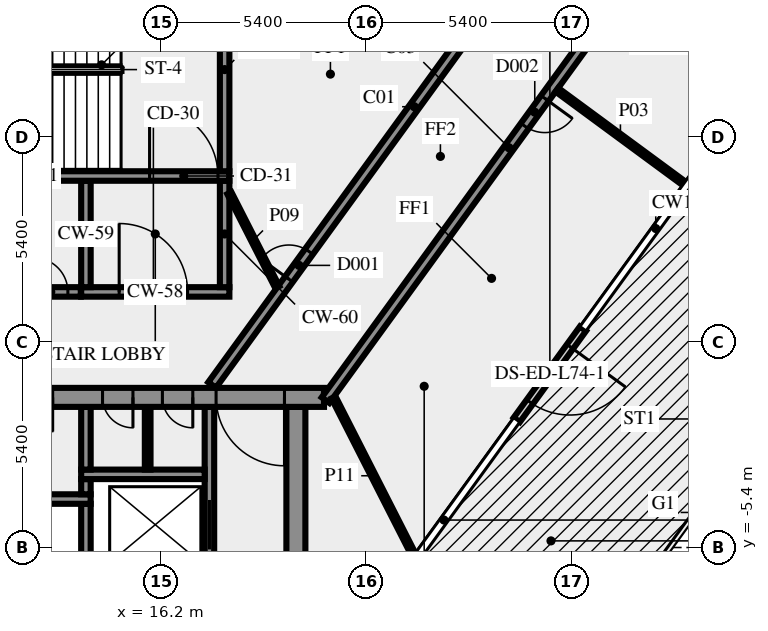
"""IFC4 building model, lengths in metres.
Left out: names, types, materials, properties, quantities, classifications, styles, units other than length and angle.
Written with IfcOpenShell. Run it as: python <this file> out.ifc"""

import sys

from ifc_helpers import new_model, si_unit, direction, frame, frame_2d, origin, place, context, subcontext, project, spatial, rectangle, extrude, element, fill, save


model = new_model("IFC4")
c1 = context("Model", 3, precision=1e-05, world=origin(), true_north=direction((0.0, 1.0)))
c2 = subcontext(c1, "Body", "Model", "MODEL_VIEW")
j1 = project(units=[si_unit("LENGTHUNIT", "METRE"), si_unit("PLANEANGLEUNIT", "RADIAN")], contexts=[c1])
p1 = place(None, origin())
s1 = spatial("IfcSite", under=j1, at=p1, CompositionType="ELEMENT")
p2 = place(p1, origin())
s2 = spatial("IfcBuilding", under=s1, at=p2, CompositionType="ELEMENT")
p3 = place(p2, frame((0.0, 0.0, 319.0)))
s3 = spatial("IfcBuildingStorey", under=s2, at=p3, CompositionType="ELEMENT", Elevation=319.0)
p4 = place(p3, frame((27.304, 0.356, 0.0), z_axis=(0.0, 0.0, 1.0), x_axis=(-0.587774760134, -0.809024617271, 0.0)))
e1 = element("IfcWall", 1, at=p4, inside=s3, PredefinedType="SOLIDWALL", context=c2, shape_type="SweptSolid", body=[
    extrude(rectangle(XDim=2.963, YDim=0.2, at=frame_2d((1.481, 0.0))), origin(), (0.0, 0.0, 1.0), 3.65),
])
p5 = place(p4, frame((0.582, 0.0, 0.0)))
e2 = element("IfcOpeningElement", 2, at=p5, cuts=e1, PredefinedType="OPENING", context=c2, shape_type="SweptSolid", body=[
    extrude(rectangle(XDim=1.8, YDim=2.4, at=frame_2d((0.9, 1.2))), frame((0.0, 0.11, 0.0), z_axis=(0.0, -1.0, 0.0), x_axis=(1.0, 0.0, 0.0)), (0.0, 0.0, 1.0), 0.22),
])
p6 = place(p3, frame((14.225, -6.0, 0.0), z_axis=(0.0, 0.0, 1.0), x_axis=(0.0, 1.0, 0.0)))
e3 = element("IfcWall", 3, at=p6, inside=s3, PredefinedType="SHEAR", context=c2, shape_type="SweptSolid", body=[
    extrude(rectangle(XDim=1.75, YDim=0.25, at=frame_2d((0.875, 0.0))), origin(), (0.0, 0.0, 1.0), 3.65),
])
p7 = place(p3, frame((17.475, -6.0, 0.0), z_axis=(0.0, 0.0, 1.0), x_axis=(0.0, 1.0, 0.0)))
e4 = element("IfcWall", 4, at=p7, inside=s3, PredefinedType="SHEAR", context=c2, shape_type="SweptSolid", body=[
    extrude(rectangle(XDim=4.3, YDim=0.25, at=frame_2d((2.15, 0.0))), origin(), (0.0, 0.0, 1.0), 3.65),
])
p8 = place(p7, frame((0.55, 0.0, 0.0)))
e5 = element("IfcOpeningElement", 5, at=p8, cuts=e4, PredefinedType="OPENING", context=c2, shape_type="SweptSolid", body=[
    extrude(rectangle(XDim=1.3, YDim=2.1, at=frame_2d((0.65, 1.05))), frame((0.0, 0.135, 0.0), z_axis=(0.0, -1.0, 0.0), x_axis=(1.0, 0.0, 0.0)), (0.0, 0.0, 1.0), 0.27),
])
p9 = place(p3, frame((19.75, -6.0, 0.0), z_axis=(0.0, 0.0, 1.0), x_axis=(0.0, 1.0, 0.0)))
e6 = element("IfcWall", 6, at=p9, inside=s3, PredefinedType="SHEAR", context=c2, shape_type="SweptSolid", body=[
    extrude(rectangle(XDim=4.3, YDim=0.5, at=frame_2d((2.15, 0.0))), origin(), (0.0, 0.0, 1.0), 3.65),
])
p10 = place(p3, frame((-0.6, -4.125, 0.0), z_axis=(0.0, 0.0, 1.0), x_axis=(1.0, 0.0, 0.0)))
e7 = element("IfcWall", 7, at=p10, inside=s3, PredefinedType="SHEAR", context=c2, shape_type="SweptSolid", body=[
    extrude(rectangle(XDim=14.95, YDim=0.25, at=frame_2d((7.475, 0.0))), origin(), (0.0, 0.0, 1.0), 3.65),
])
p11 = place(p10, frame((2.75, 0.0, 0.0)))
e8 = element("IfcOpeningElement", 8, at=p11, cuts=e7, PredefinedType="OPENING", context=c2, shape_type="SweptSolid", body=[
    extrude(rectangle(XDim=1.3, YDim=2.1, at=frame_2d((0.65, 1.05))), frame((0.0, 0.135, 0.0), z_axis=(0.0, -1.0, 0.0), x_axis=(1.0, 0.0, 0.0)), (0.0, 0.0, 1.0), 0.27),
])
p12 = place(p3, frame((14.225, -4.0, 0.0), z_axis=(0.0, 0.0, 1.0), x_axis=(0.0, 1.0, 0.0)))
e9 = element("IfcWall", 9, at=p12, inside=s3, PredefinedType="SHEAR", context=c2, shape_type="SweptSolid", body=[
    extrude(rectangle(XDim=0.4, YDim=0.25, at=frame_2d((0.2, 0.0))), origin(), (0.0, 0.0, 1.0), 3.65),
])
p13 = place(p3, frame((14.1, -3.475, 0.0), z_axis=(0.0, 0.0, 1.0), x_axis=(1.0, 0.0, 0.0)))
e10 = element("IfcWall", 10, at=p13, inside=s3, PredefinedType="SHEAR", context=c2, shape_type="SweptSolid", body=[
    extrude(rectangle(XDim=3.25, YDim=0.25, at=frame_2d((1.625, 0.0))), origin(), (0.0, 0.0, 1.0), 3.65),
])
p14 = place(p3, frame((14.225, -3.35, 0.0), z_axis=(0.0, 0.0, 1.0), x_axis=(0.0, 1.0, 0.0)))
e11 = element("IfcWall", 11, at=p14, inside=s3, PredefinedType="SHEAR", context=c2, shape_type="SweptSolid", body=[
    extrude(rectangle(XDim=1.65, YDim=0.25, at=frame_2d((0.825, 0.0))), origin(), (0.0, 0.0, 1.0), 3.65),
])
p15 = place(p3, frame((15.85, -3.35, 0.0), z_axis=(0.0, 0.0, 1.0), x_axis=(0.0, 1.0, 0.0)))
e12 = element("IfcWall", 12, at=p15, inside=s3, PredefinedType="PARTITIONING", context=c2, shape_type="SweptSolid", body=[
    extrude(rectangle(XDim=1.65, YDim=0.15, at=frame_2d((0.825, 0.0))), origin(), (0.0, 0.0, 1.0), 3.65),
])
p16 = place(p3, frame((20.49, -1.45, 0.0), z_axis=(0.0, 0.0, 1.0), x_axis=(-1.0, 0.0, 0.0)))
e13 = element("IfcWall", 13, at=p16, inside=s3, PredefinedType="SHEAR", context=c2, shape_type="SweptSolid", body=[
    extrude(rectangle(XDim=40.98, YDim=0.5, at=frame_2d((20.49, 0.0))), origin(), (0.0, 0.0, 1.0), 3.65),
])
p17 = place(p16, frame((38.14, 0.0, 0.0)))
e14 = element("IfcOpeningElement", 14, at=p17, cuts=e13, PredefinedType="OPENING", context=c2, shape_type="SweptSolid", body=[
    extrude(rectangle(XDim=1.8, YDim=2.1, at=frame_2d((0.9, 1.05))), frame((0.0, 0.26, 0.0), z_axis=(0.0, -1.0, 0.0), x_axis=(1.0, 0.0, 0.0)), (0.0, 0.0, 1.0), 0.52),
])
p18 = place(p16, frame((35.89, 0.0, 0.0)))
e15 = element("IfcOpeningElement", 15, at=p18, cuts=e13, PredefinedType="OPENING", context=c2, shape_type="SweptSolid", body=[
    extrude(rectangle(XDim=0.9, YDim=2.1, at=frame_2d((0.45, 1.05))), frame((0.0, 0.26, 0.0), z_axis=(0.0, -1.0, 0.0), x_axis=(1.0, 0.0, 0.0)), (0.0, 0.0, 1.0), 0.52),
])
p19 = place(p16, frame((32.94, 0.0, 0.0)))
e16 = element("IfcOpeningElement", 16, at=p19, cuts=e13, PredefinedType="OPENING", context=c2, shape_type="SweptSolid", body=[
    extrude(rectangle(XDim=0.9, YDim=2.1, at=frame_2d((0.45, 1.05))), frame((0.0, 0.26, 0.0), z_axis=(0.0, -1.0, 0.0), x_axis=(1.0, 0.0, 0.0)), (0.0, 0.0, 1.0), 0.52),
])
p20 = place(p16, frame((31.015, 0.0, 0.0)))
e17 = element("IfcOpeningElement", 17, at=p20, cuts=e13, PredefinedType="OPENING", context=c2, shape_type="SweptSolid", body=[
    extrude(rectangle(XDim=0.8, YDim=2.1, at=frame_2d((0.4, 1.05))), frame((0.0, 0.26, 0.0), z_axis=(0.0, -1.0, 0.0), x_axis=(1.0, 0.0, 0.0)), (0.0, 0.0, 1.0), 0.52),
])
p21 = place(p16, frame((24.765, 0.0, 0.0)))
e18 = element("IfcOpeningElement", 18, at=p21, cuts=e13, PredefinedType="OPENING", context=c2, shape_type="SweptSolid", body=[
    extrude(rectangle(XDim=0.8, YDim=2.1, at=frame_2d((0.4, 1.05))), frame((0.0, 0.26, 0.0), z_axis=(0.0, -1.0, 0.0), x_axis=(1.0, 0.0, 0.0)), (0.0, 0.0, 1.0), 0.52),
])
p22 = place(p16, frame((21.765, 0.0, 0.0)))
e19 = element("IfcOpeningElement", 19, at=p22, cuts=e13, PredefinedType="OPENING", context=c2, shape_type="SweptSolid", body=[
    extrude(rectangle(XDim=2.0, YDim=2.1, at=frame_2d((1.0, 1.05))), frame((0.0, 0.26, 0.0), z_axis=(0.0, -1.0, 0.0), x_axis=(1.0, 0.0, 0.0)), (0.0, 0.0, 1.0), 0.52),
])
p23 = place(p16, frame((15.103, 0.0, 0.0)))
e20 = element("IfcOpeningElement", 20, at=p23, cuts=e13, PredefinedType="OPENING", context=c2, shape_type="SweptSolid", body=[
    extrude(rectangle(XDim=0.9, YDim=2.1, at=frame_2d((0.45, 1.05))), frame((0.0, 0.26, 0.0), z_axis=(0.0, -1.0, 0.0), x_axis=(1.0, 0.0, 0.0)), (0.0, 0.0, 1.0), 0.52),
])
p24 = place(p16, frame((13.04, 0.0, 0.0)))
e21 = element("IfcOpeningElement", 21, at=p24, cuts=e13, PredefinedType="OPENING", context=c2, shape_type="SweptSolid", body=[
    extrude(rectangle(XDim=0.9, YDim=2.1, at=frame_2d((0.45, 1.05))), frame((0.0, 0.26, 0.0), z_axis=(0.0, -1.0, 0.0), x_axis=(1.0, 0.0, 0.0)), (0.0, 0.0, 1.0), 0.52),
])
p25 = place(p16, frame((10.177, 0.0, 0.0)))
e22 = element("IfcOpeningElement", 22, at=p25, cuts=e13, PredefinedType="OPENING", context=c2, shape_type="SweptSolid", body=[
    extrude(rectangle(XDim=0.9, YDim=2.1, at=frame_2d((0.45, 1.05))), frame((0.0, 0.26, 0.0), z_axis=(0.0, -1.0, 0.0), x_axis=(1.0, 0.0, 0.0)), (0.0, 0.0, 1.0), 0.52),
])
p26 = place(p16, frame((7.14, 0.0, 0.0)))
e23 = element("IfcOpeningElement", 23, at=p26, cuts=e13, PredefinedType="OPENING", context=c2, shape_type="SweptSolid", body=[
    extrude(rectangle(XDim=0.9, YDim=2.1, at=frame_2d((0.45, 1.05))), frame((0.0, 0.26, 0.0), z_axis=(0.0, -1.0, 0.0), x_axis=(1.0, 0.0, 0.0)), (0.0, 0.0, 1.0), 0.52),
])
p27 = place(p16, frame((5.028, 0.0, 0.0)))
e24 = element("IfcOpeningElement", 24, at=p27, cuts=e13, PredefinedType="OPENING", context=c2, shape_type="SweptSolid", body=[
    extrude(rectangle(XDim=0.8, YDim=2.1, at=frame_2d((0.4, 1.05))), frame((0.0, 0.26, 0.0), z_axis=(0.0, -1.0, 0.0), x_axis=(1.0, 0.0, 0.0)), (0.0, 0.0, 1.0), 0.52),
])
p28 = place(p16, frame((3.452, 0.0, 0.0)))
e25 = element("IfcOpeningElement", 25, at=p28, cuts=e13, PredefinedType="OPENING", context=c2, shape_type="SweptSolid", body=[
    extrude(rectangle(XDim=0.8, YDim=2.1, at=frame_2d((0.4, 1.05))), frame((0.0, 0.26, 0.0), z_axis=(0.0, -1.0, 0.0), x_axis=(1.0, 0.0, 0.0)), (0.0, 0.0, 1.0), 0.52),
])
p29 = place(p16, frame((1.04, 0.0, 0.0)))
e26 = element("IfcOpeningElement", 26, at=p29, cuts=e13, PredefinedType="OPENING", context=c2, shape_type="SweptSolid", body=[
    extrude(rectangle(XDim=1.8, YDim=2.1, at=frame_2d((0.9, 1.05))), frame((0.0, 0.26, 0.0), z_axis=(0.0, -1.0, 0.0), x_axis=(1.0, 0.0, 0.0)), (0.0, 0.0, 1.0), 0.52),
])
p30 = place(p3, frame((14.1, 1.325, 0.0), z_axis=(0.0, 0.0, 1.0), x_axis=(1.0, 0.0, 0.0)))
e27 = element("IfcWall", 27, at=p30, inside=s3, PredefinedType="SHEAR", context=c2, shape_type="SweptSolid", body=[
    extrude(rectangle(XDim=3.9, YDim=0.25, at=frame_2d((1.95, 0.0))), origin(), (0.0, 0.0, 1.0), 3.65),
])
p31 = place(p30, frame((1.0, 0.0, 0.0)))
e28 = element("IfcOpeningElement", 28, at=p31, cuts=e27, PredefinedType="OPENING", context=c2, shape_type="SweptSolid", body=[
    extrude(rectangle(XDim=1.8, YDim=2.1, at=frame_2d((0.9, 1.05))), frame((0.0, 0.135, 0.0), z_axis=(0.0, -1.0, 0.0), x_axis=(1.0, 0.0, 0.0)), (0.0, 0.0, 1.0), 0.27),
])
for number, where, z_axis, x_axis in (
    (29, (14.225, 1.45, 0.0), (0.0, 0.0, 1.0), (0.0, 1.0, 0.0)),
    (30, (17.875, 1.45, 0.0), (0.0, 0.0, 1.0), (0.0, 1.0, 0.0)),
):
    element("IfcWall", number, at=place(p3, frame(where, z_axis=z_axis, x_axis=x_axis)), inside=s3, PredefinedType="SHEAR", context=c2, shape_type="SweptSolid", body=[
        extrude(rectangle(XDim=2.8, YDim=0.25, at=frame_2d((1.4, 0.0))), origin(), (0.0, 0.0, 1.0), 3.65),
    ])
p32 = place(p3, frame((7.5, 4.375, 0.0), z_axis=(0.0, 0.0, 1.0), x_axis=(1.0, 0.0, 0.0)))
e31 = element("IfcWall", 31, at=p32, inside=s3, PredefinedType="SHEAR", context=c2, shape_type="SweptSolid", body=[
    extrude(rectangle(XDim=10.5, YDim=0.25, at=frame_2d((5.25, 0.0))), origin(), (0.0, 0.0, 1.0), 3.65),
])
p33 = place(p32, frame((8.4, 0.0, 0.0)))
e32 = element("IfcOpeningElement", 32, at=p33, cuts=e31, PredefinedType="OPENING", context=c2, shape_type="SweptSolid", body=[
    extrude(rectangle(XDim=1.8, YDim=2.1, at=frame_2d((0.9, 1.05))), frame((0.0, 0.135, 0.0), z_axis=(0.0, -1.0, 0.0), x_axis=(1.0, 0.0, 0.0)), (0.0, 0.0, 1.0), 0.27),
])
p34 = place(p3, frame((17.875, 4.5, 0.0), z_axis=(0.0, 0.0, 1.0), x_axis=(0.0, 1.0, 0.0)))
e33 = element("IfcWall", 33, at=p34, inside=s3, PredefinedType="SHEAR", context=c2, shape_type="SweptSolid", body=[
    extrude(rectangle(XDim=5.35, YDim=0.25, at=frame_2d((2.675, 0.0))), origin(), (0.0, 0.0, 1.0), 3.65),
])
p35 = place(p3, frame((17.545, -1.125, 0.0), z_axis=(0.0, 0.0, 1.0), x_axis=(0.58779555165, 0.809009511354, 0.0)))
e34 = element("IfcWall", 34, at=p35, inside=s3, PredefinedType="SOLIDWALL", context=c2, shape_type="SweptSolid", body=[
    extrude(rectangle(XDim=18.103, YDim=0.25, at=frame_2d((9.052, 0.0))), origin(), (0.0, 0.0, 1.0), 3.65),
])
p36 = place(p35, frame((3.441, 0.0, 0.0)))
e35 = element("IfcOpeningElement", 35, at=p36, cuts=e34, PredefinedType="OPENING", context=c2, shape_type="SweptSolid", body=[
    extrude(rectangle(XDim=0.9, YDim=2.1, at=frame_2d((0.45, 1.05))), frame((0.0, 0.135, 0.0), z_axis=(0.0, -1.0, 0.0), x_axis=(1.0, 0.0, 0.0)), (0.0, 0.0, 1.0), 0.27),
])
p37 = place(p3, frame((30.183, 11.761, 0.0), z_axis=(0.0, 0.0, 1.0), x_axis=(-0.587781762867, -0.80901952958, 0.0)))
e36 = element("IfcWall", 36, at=p37, inside=s3, PredefinedType="SOLIDWALL", context=c2, shape_type="SweptSolid", body=[
    extrude(rectangle(XDim=16.42, YDim=0.25, at=frame_2d((8.21, 0.0))), origin(), (0.0, 0.0, 1.0), 3.65),
])
p38 = place(p37, frame((0.225, 0.0, 0.0)))
e37 = element("IfcOpeningElement", 37, at=p38, cuts=e36, PredefinedType="OPENING", context=c2, shape_type="SweptSolid", body=[
    extrude(rectangle(XDim=0.9, YDim=2.1, at=frame_2d((0.45, 1.05))), frame((0.0, 0.135, 0.0), z_axis=(0.0, -1.0, 0.0), x_axis=(1.0, 0.0, 0.0)), (0.0, 0.0, 1.0), 0.27),
])
p39 = place(p37, frame((6.605, 0.0, 0.0)))
e38 = element("IfcOpeningElement", 38, at=p39, cuts=e36, PredefinedType="OPENING", context=c2, shape_type="SweptSolid", body=[
    extrude(rectangle(XDim=0.9, YDim=2.1, at=frame_2d((0.45, 1.05))), frame((0.0, 0.135, 0.0), z_axis=(0.0, -1.0, 0.0), x_axis=(1.0, 0.0, 0.0)), (0.0, 0.0, 1.0), 0.27),
])
p40 = place(p3, frame((-5.246, 1.325, 0.0), z_axis=(0.0, 0.0, 1.0), x_axis=(1.0, 0.0, 0.0)))
e39 = element("IfcWall", 39, at=p40, inside=s3, PredefinedType="SOLIDWALL", context=c2, shape_type="SweptSolid", body=[
    extrude(rectangle(XDim=19.336, YDim=0.25, at=frame_2d((9.668, 0.0))), origin(), (0.0, 0.0, 1.0), 3.65),
])
p41 = place(p40, frame((10.894, 0.0, 0.0)))
e40 = element("IfcOpeningElement", 40, at=p41, cuts=e39, PredefinedType="OPENING", context=c2, shape_type="SweptSolid", body=[
    extrude(rectangle(XDim=1.2, YDim=2.1, at=frame_2d((0.6, 1.05))), frame((0.0, 0.135, 0.0), z_axis=(0.0, -1.0, 0.0), x_axis=(1.0, 0.0, 0.0)), (0.0, 0.0, 1.0), 0.27),
])
p42 = place(p40, frame((18.096, 0.0, 0.0)))
e41 = element("IfcOpeningElement", 41, at=p42, cuts=e39, PredefinedType="OPENING", context=c2, shape_type="SweptSolid", body=[
    extrude(rectangle(XDim=0.9, YDim=2.1, at=frame_2d((0.45, 1.05))), frame((0.0, 0.135, 0.0), z_axis=(0.0, -1.0, 0.0), x_axis=(1.0, 0.0, 0.0)), (0.0, 0.0, 1.0), 0.27),
])
p43 = place(p3, frame((26.619, 6.643, 0.0), z_axis=(0.0, 0.0, 1.0), x_axis=(0.805298264495, -0.592869888931, 0.0)))
e42 = element("IfcWall", 42, at=p43, inside=s3, PredefinedType="PARTITIONING", context=c2, shape_type="SweptSolid", body=[
    extrude(rectangle(XDim=4.15, YDim=0.12, at=frame_2d((2.075, 0.0))), origin(), (0.0, 0.0, 1.0), 3.65),
])
p44 = place(p3, frame((18.0, 3.925, 0.0), z_axis=(0.0, 0.0, 1.0), x_axis=(0.453950796792, -0.891026752736, 0.0)))
e43 = element("IfcWall", 43, at=p44, inside=s3, PredefinedType="PARTITIONING", context=c2, shape_type="SweptSolid", body=[
    extrude(rectangle(XDim=2.778, YDim=0.12, at=frame_2d((1.389, 0.0))), origin(), (0.0, 0.0, 1.0), 3.65),
])
p45 = place(p3, frame((20.739, -1.45, 0.0), z_axis=(0.0, 0.0, 1.0), x_axis=(0.453931312426, -0.891036679155, 0.0)))
e44 = element("IfcWall", 44, at=p45, inside=s3, PredefinedType="PARTITIONING", context=c2, shape_type="SweptSolid", body=[
    extrude(rectangle(XDim=4.629, YDim=0.12, at=frame_2d((2.314, 0.0))), origin(), (0.0, 0.0, 1.0), 3.65),
])
p46 = place(p5, origin())
e45 = element("IfcDoor", 45, at=p46, inside=s3, OperationType="DOUBLE_DOOR_SINGLE_SWING", PredefinedType="DOOR", context=c2, shape_type="SweptSolid", body=[
    extrude(rectangle(XDim=1.8, YDim=2.4, at=frame_2d((0.9, 1.2))), frame((0.0, 0.025, 0.0), z_axis=(0.0, -1.0, 0.0), x_axis=(1.0, 0.0, 0.0)), (0.0, 0.0, 1.0), 0.05),
])
fill(e2, e45)
p47 = place(p8, origin())
e46 = element("IfcDoor", 46, at=p47, inside=s3, OperationType="DOUBLE_DOOR_SLIDING", PredefinedType="DOOR", context=c2, shape_type="SweptSolid", body=[
    extrude(rectangle(XDim=1.3, YDim=2.1, at=frame_2d((0.65, 1.05))), frame((0.0, 0.025, 0.0), z_axis=(0.0, -1.0, 0.0), x_axis=(1.0, 0.0, 0.0)), (0.0, 0.0, 1.0), 0.05),
])
fill(e5, e46)
p48 = place(p27, origin())
e47 = element("IfcDoor", 47, at=p48, inside=s3, OperationType="SINGLE_SWING_LEFT", PredefinedType="DOOR", context=c2, shape_type="SweptSolid", body=[
    extrude(rectangle(XDim=0.8, YDim=2.1, at=frame_2d((0.4, 1.05))), frame((0.0, 0.025, 0.0), z_axis=(0.0, -1.0, 0.0), x_axis=(1.0, 0.0, 0.0)), (0.0, 0.0, 1.0), 0.05),
])
fill(e24, e47)
p49 = place(p28, origin())
e48 = element("IfcDoor", 48, at=p49, inside=s3, OperationType="SINGLE_SWING_LEFT", PredefinedType="DOOR", context=c2, shape_type="SweptSolid", body=[
    extrude(rectangle(XDim=0.8, YDim=2.1, at=frame_2d((0.4, 1.05))), frame((0.0, 0.025, 0.0), z_axis=(0.0, -1.0, 0.0), x_axis=(1.0, 0.0, 0.0)), (0.0, 0.0, 1.0), 0.05),
])
fill(e25, e48)
p50 = place(p29, origin())
e49 = element("IfcDoor", 49, at=p50, inside=s3, OperationType="DOUBLE_DOOR_SINGLE_SWING", PredefinedType="DOOR", context=c2, shape_type="SweptSolid", body=[
    extrude(rectangle(XDim=1.8, YDim=2.1, at=frame_2d((0.9, 1.05))), frame((0.0, 0.025, 0.0), z_axis=(0.0, -1.0, 0.0), x_axis=(1.0, 0.0, 0.0)), (0.0, 0.0, 1.0), 0.05),
])
fill(e26, e49)
p51 = place(p31, origin())
e50 = element("IfcDoor", 50, at=p51, inside=s3, OperationType="DOUBLE_DOOR_SINGLE_SWING", PredefinedType="DOOR", context=c2, shape_type="SweptSolid", body=[
    extrude(rectangle(XDim=1.8, YDim=2.1, at=frame_2d((0.9, 1.05))), frame((0.0, 0.025, 0.0), z_axis=(0.0, -1.0, 0.0), x_axis=(1.0, 0.0, 0.0)), (0.0, 0.0, 1.0), 0.05),
])
fill(e28, e50)
p52 = place(p33, origin())
e51 = element("IfcDoor", 51, at=p52, inside=s3, OperationType="DOUBLE_DOOR_SINGLE_SWING", PredefinedType="DOOR", context=c2, shape_type="SweptSolid", body=[
    extrude(rectangle(XDim=1.8, YDim=2.1, at=frame_2d((0.9, 1.05))), frame((0.0, 0.025, 0.0), z_axis=(0.0, -1.0, 0.0), x_axis=(1.0, 0.0, 0.0)), (0.0, 0.0, 1.0), 0.05),
])
fill(e32, e51)
p53 = place(p36, origin())
e52 = element("IfcDoor", 52, at=p53, inside=s3, OperationType="SINGLE_SWING_LEFT", PredefinedType="DOOR", context=c2, shape_type="SweptSolid", body=[
    extrude(rectangle(XDim=0.9, YDim=2.1, at=frame_2d((0.45, 1.05))), frame((0.0, 0.025, 0.0), z_axis=(0.0, -1.0, 0.0), x_axis=(1.0, 0.0, 0.0)), (0.0, 0.0, 1.0), 0.05),
])
fill(e35, e52)
p54 = place(p39, origin())
e53 = element("IfcDoor", 53, at=p54, inside=s3, OperationType="SINGLE_SWING_LEFT", PredefinedType="DOOR", context=c2, shape_type="SweptSolid", body=[
    extrude(rectangle(XDim=0.9, YDim=2.1, at=frame_2d((0.45, 1.05))), frame((0.0, 0.025, 0.0), z_axis=(0.0, -1.0, 0.0), x_axis=(1.0, 0.0, 0.0)), (0.0, 0.0, 1.0), 0.05),
])
fill(e38, e53)
p55 = place(p42, origin())
e54 = element("IfcDoor", 54, at=p55, inside=s3, OperationType="SINGLE_SWING_RIGHT", PredefinedType="DOOR", context=c2, shape_type="SweptSolid", body=[
    extrude(rectangle(XDim=0.9, YDim=2.1, at=frame_2d((0.45, 1.05))), frame((0.0, 0.025, 0.0), z_axis=(0.0, -1.0, 0.0), x_axis=(1.0, 0.0, 0.0)), (0.0, 0.0, 1.0), 0.05),
])
fill(e41, e54)
save(model, sys.argv[1])
